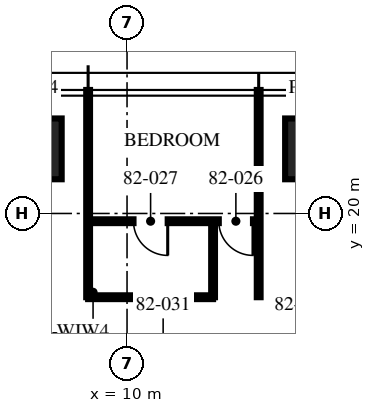
"""IFC4 building model, lengths in metres.
Left out: names, types, materials, properties, quantities, classifications, styles, units other than length and angle.
Written with IfcOpenShell. Run it as: python <this file> out.ifc"""

import sys

from ifc_helpers import new_model, si_unit, direction, frame, frame_2d, origin, origin_2d, place, context, subcontext, project, spatial, rectangle, extrude, element, fill, save


model = new_model("IFC4")
c1 = context("Model", 3, precision=1e-05, world=origin(), true_north=direction((0.0, 1.0)))
c2 = subcontext(c1, "Body", "Model", "MODEL_VIEW")
j1 = project(units=[si_unit("LENGTHUNIT", "METRE"), si_unit("PLANEANGLEUNIT", "RADIAN")], contexts=[c1])
p1 = place(None, origin())
s1 = spatial("IfcSite", under=j1, at=p1, CompositionType="ELEMENT")
p2 = place(p1, origin())
s2 = spatial("IfcBuilding", under=s1, at=p2, CompositionType="ELEMENT")
p3 = place(p2, frame((0.0, 0.0, 327.0)))
s3 = spatial("IfcBuildingStorey", under=s2, at=p3, CompositionType="ELEMENT", Elevation=327.0)
for number, where, z_axis, x_axis in (
    (1, (7.48, 21.7, 0.0), (0.0, 0.0, 1.0), (1.0, 0.0, 0.0)),
    (2, (14.96, 21.7, 0.0), (0.0, 0.0, 1.0), (1.0, 0.0, 0.0)),
):
    element("IfcColumn", number, at=place(p3, frame(where, z_axis=z_axis, x_axis=x_axis)), inside=s3, PredefinedType="COLUMN", context=c2, shape_type="SweptSolid", body=[
        extrude(rectangle(XDim=1.6, YDim=1.6, at=origin_2d()), origin(), (0.0, 0.0, 1.0), 3.75),
    ])
for number, where, z_axis, x_axis in (
    (3, (13.464, 17.796, 0.0), (0.0, 0.0, 1.0), (0.0, 1.0, 0.0)),
    (4, (8.976, 17.796, 0.0), (0.0, 0.0, 1.0), (0.0, 1.0, 0.0)),
):
    element("IfcWall", number, at=place(p3, frame(where, z_axis=z_axis, x_axis=x_axis)), inside=s3, PredefinedType="PARTITIONING", context=c2, shape_type="SweptSolid", body=[
        extrude(rectangle(XDim=5.454, YDim=0.1, at=frame_2d((2.727, 0.0))), origin(), (0.0, 0.0, 1.0), 3.01),
    ])
p4 = place(p3, frame((13.464, 19.796, 0.0), z_axis=(0.0, 0.0, 1.0), x_axis=(-1.0, 0.0, 0.0)))
e5 = element("IfcWall", 5, at=p4, inside=s3, PredefinedType="PARTITIONING", context=c2, shape_type="SweptSolid", body=[
    extrude(rectangle(XDim=4.488, YDim=0.1, at=frame_2d((2.244, 0.0))), origin(), (0.0, 0.0, 1.0), 2.91),
])
p5 = place(p4, frame((0.15, 0.0, 0.0)))
e6 = element("IfcOpeningElement", 6, at=p5, cuts=e5, PredefinedType="OPENING", context=c2, shape_type="SweptSolid", body=[
    extrude(rectangle(XDim=0.9, YDim=2.1, at=frame_2d((0.45, 1.05))), frame((0.0, 0.06, 0.0), z_axis=(0.0, -1.0, 0.0), x_axis=(1.0, 0.0, 0.0)), (0.0, 0.0, 1.0), 0.12),
])
p6 = place(p4, frame((2.394, 0.0, 0.0)))
e7 = element("IfcOpeningElement", 7, at=p6, cuts=e5, PredefinedType="OPENING", context=c2, shape_type="SweptSolid", body=[
    extrude(rectangle(XDim=0.9, YDim=2.1, at=frame_2d((0.45, 1.05))), frame((0.0, 0.06, 0.0), z_axis=(0.0, -1.0, 0.0), x_axis=(1.0, 0.0, 0.0)), (0.0, 0.0, 1.0), 0.12),
])
p7 = place(p3, frame((12.264, 17.796, 0.0), z_axis=(0.0, 0.0, 1.0), x_axis=(0.0, 1.0, 0.0)))
e8 = element("IfcWall", 8, at=p7, inside=s3, PredefinedType="PARTITIONING", context=c2, shape_type="SweptSolid", body=[
    extrude(rectangle(XDim=2.0, YDim=0.1, at=frame_2d((1.0, 0.0))), origin(), (0.0, 0.0, 1.0), 3.5),
])
p8 = place(p3, frame((12.264, 17.796, 0.0), z_axis=(0.0, 0.0, 1.0), x_axis=(-1.0, 0.0, 0.0)))
e9 = element("IfcWall", 9, at=p8, inside=s3, PredefinedType="PARTITIONING", context=c2, shape_type="SweptSolid", body=[
    extrude(rectangle(XDim=3.288, YDim=0.1, at=frame_2d((1.644, 0.0))), origin(), (0.0, 0.0, 1.0), 2.91),
])
p9 = place(p5, origin())
e10 = element("IfcDoor", 10, at=p9, inside=s3, OperationType="SINGLE_SWING_LEFT", PredefinedType="DOOR", context=c2, shape_type="SweptSolid", body=[
    extrude(rectangle(XDim=0.9, YDim=2.1, at=frame_2d((0.45, 1.05))), frame((0.0, 0.025, 0.0), z_axis=(0.0, -1.0, 0.0), x_axis=(1.0, 0.0, 0.0)), (0.0, 0.0, 1.0), 0.05),
])
fill(e6, e10)
p10 = place(p6, origin())
e11 = element("IfcDoor", 11, at=p10, inside=s3, OperationType="SINGLE_SWING_LEFT", PredefinedType="DOOR", context=c2, shape_type="SweptSolid", body=[
    extrude(rectangle(XDim=0.9, YDim=2.1, at=frame_2d((0.45, 1.05))), frame((0.0, 0.025, 0.0), z_axis=(0.0, -1.0, 0.0), x_axis=(1.0, 0.0, 0.0)), (0.0, 0.0, 1.0), 0.05),
])
fill(e7, e11)
save(model, sys.argv[1])
